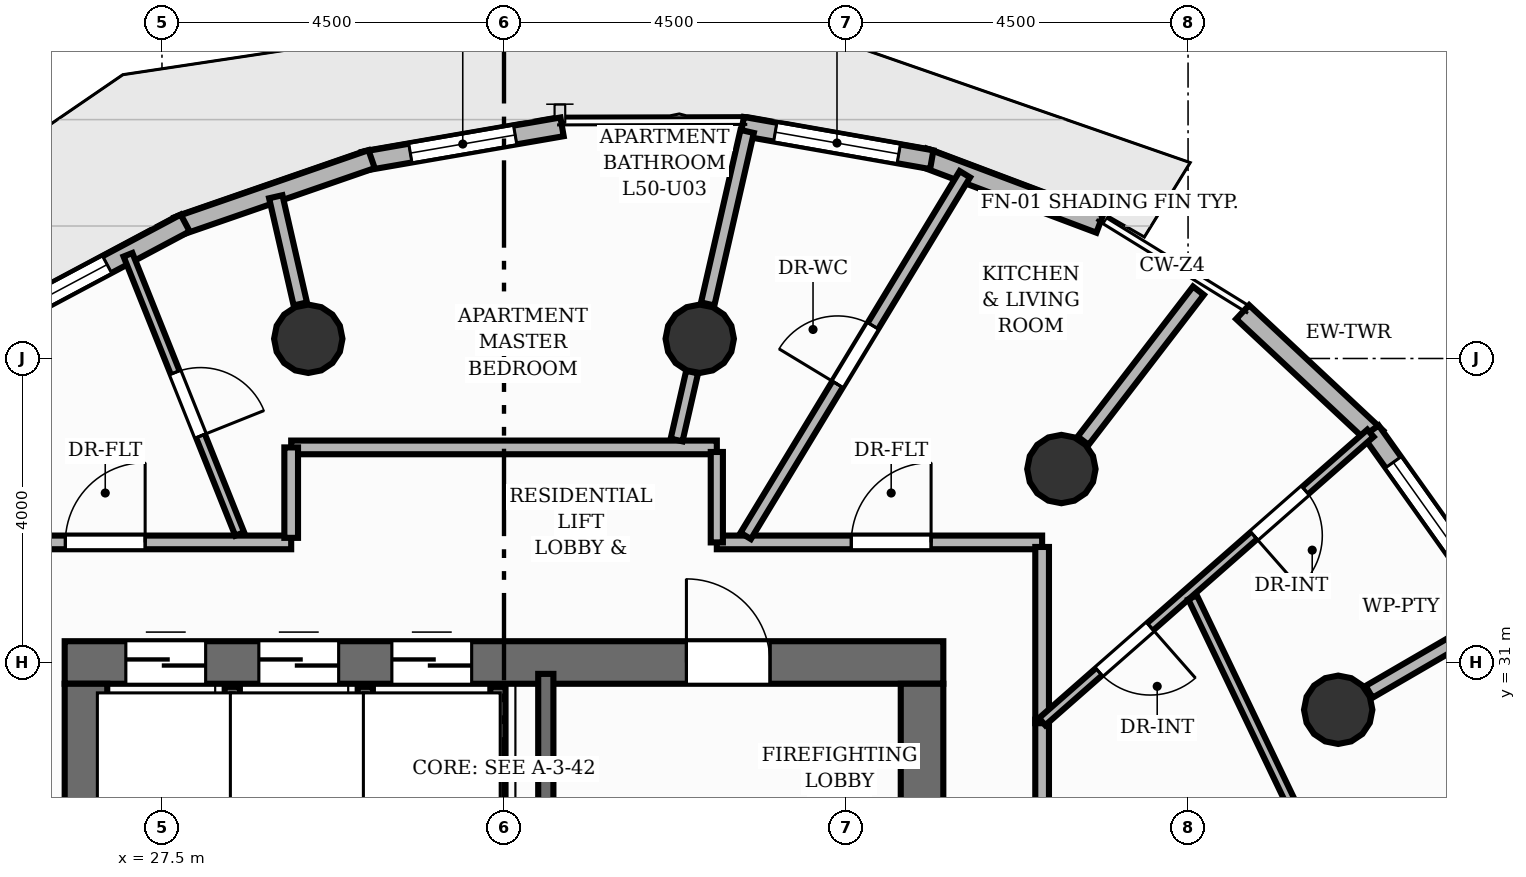
"""IFC4 building model, lengths in metres.
Left out: names, types, materials, properties, quantities, classifications, styles, units other than length and angle.
Written with IfcOpenShell. Run it as: python <this file> out.ifc"""

import sys

from ifc_helpers import new_model, si_unit, direction, frame, frame_2d, origin, origin_2d, place, context, subcontext, project, spatial, rectangle, circle, extrude, element, fill, save


model = new_model("IFC4")
c1 = context("Model", 3, precision=1e-05, world=origin(), true_north=direction((0.0, 1.0)))
c2 = subcontext(c1, "Body", "Model", "MODEL_VIEW")
j1 = project(units=[si_unit("LENGTHUNIT", "METRE"), si_unit("PLANEANGLEUNIT", "RADIAN")], contexts=[c1])
p1 = place(None, origin())
s1 = spatial("IfcSite", under=j1, at=p1, CompositionType="ELEMENT")
p2 = place(p1, origin())
s2 = spatial("IfcBuilding", under=s1, at=p2, CompositionType="ELEMENT")
p3 = place(p2, frame((0.0, 0.0, 169.44)))
s3 = spatial("IfcBuildingStorey", under=s2, at=p3, CompositionType="ELEMENT", Elevation=169.44)
p4 = place(p3, frame((26.22, 31.0, 0.0), z_axis=(0.0, 0.0, 1.0), x_axis=(1.0, 0.0, 0.0)))
e1 = element("IfcWall", 1, at=p4, inside=s3, PredefinedType="SHEAR", context=c2, shape_type="SweptSolid", body=[
    extrude(rectangle(XDim=11.56, YDim=0.56, at=frame_2d((5.78, 0.0))), origin(), (0.0, 0.0, 1.0), 3.2),
])
p5 = place(p4, frame((8.18, 0.0, 0.0)))
e2 = element("IfcOpeningElement", 2, at=p5, cuts=e1, PredefinedType="OPENING", context=c2, shape_type="SweptSolid", body=[
    extrude(rectangle(XDim=1.1, YDim=2.15, at=frame_2d((0.55, 1.075))), frame((0.0, 0.29, 0.0), z_axis=(0.0, -1.0, 0.0), x_axis=(1.0, 0.0, 0.0)), (0.0, 0.0, 1.0), 0.58),
])
p6 = place(p4, frame((0.805, 0.0, 0.0)))
e3 = element("IfcOpeningElement", 3, at=p6, cuts=e1, PredefinedType="OPENING", context=c2, shape_type="SweptSolid", body=[
    extrude(rectangle(XDim=1.05, YDim=2.15, at=frame_2d((0.525, 1.075))), frame((0.0, 0.29, 0.0), z_axis=(0.0, -1.0, 0.0), x_axis=(1.0, 0.0, 0.0)), (0.0, 0.0, 1.0), 0.58),
])
p7 = place(p4, frame((2.555, 0.0, 0.0)))
e4 = element("IfcOpeningElement", 4, at=p7, cuts=e1, PredefinedType="OPENING", context=c2, shape_type="SweptSolid", body=[
    extrude(rectangle(XDim=1.05, YDim=2.15, at=frame_2d((0.525, 1.075))), frame((0.0, 0.29, 0.0), z_axis=(0.0, -1.0, 0.0), x_axis=(1.0, 0.0, 0.0)), (0.0, 0.0, 1.0), 0.58),
])
p8 = place(p4, frame((4.305, 0.0, 0.0)))
e5 = element("IfcOpeningElement", 5, at=p8, cuts=e1, PredefinedType="OPENING", context=c2, shape_type="SweptSolid", body=[
    extrude(rectangle(XDim=1.05, YDim=2.15, at=frame_2d((0.525, 1.075))), frame((0.0, 0.29, 0.0), z_axis=(0.0, -1.0, 0.0), x_axis=(1.0, 0.0, 0.0)), (0.0, 0.0, 1.0), 0.58),
])
for number, where, z_axis, x_axis in (
    (6, (26.5, 17.28, 0.0), (0.0, 0.0, 1.0), (0.0, 1.0, 0.0)),
    (7, (37.5, 17.28, 0.0), (0.0, 0.0, 1.0), (0.0, 1.0, 0.0)),
):
    element("IfcWall", number, at=place(p3, frame(where, z_axis=z_axis, x_axis=x_axis)), inside=s3, PredefinedType="SHEAR", context=c2, shape_type="SweptSolid", body=[
        extrude(rectangle(XDim=13.44, YDim=0.56, at=frame_2d((6.72, 0.0))), origin(), (0.0, 0.0, 1.0), 3.2),
    ])
for number, where, z_axis, x_axis in (
    (8, (42.975, 30.378, 0.0), (0.0, 0.0, 1.0), (1.0, 0.0, 0.0)),
    (9, (39.333, 33.545, 0.0), (0.0, 0.0, 1.0), (1.0, 0.0, 0.0)),
    (10, (34.575, 35.26, 0.0), (0.0, 0.0, 1.0), (1.0, 0.0, 0.0)),
    (11, (29.425, 35.26, 0.0), (0.0, 0.0, 1.0), (1.0, 0.0, 0.0)),
):
    element("IfcColumn", number, at=place(p3, frame(where, z_axis=z_axis, x_axis=x_axis)), inside=s3, PredefinedType="COLUMN", context=c2, shape_type="SweptSolid", body=[
        extrude(circle(Radius=0.45, at=origin_2d()), origin(), (0.0, 0.0, 1.0), 3.2),
    ])
p9 = place(p3, frame((41.718, 35.611, 0.0), z_axis=(0.0, 0.0, 1.0), x_axis=(0.730224222865, -0.683207570465, 0.0)))
e12 = element("IfcWall", 12, at=p9, inside=s3, PredefinedType="SOLIDWALL", context=c2, shape_type="SweptSolid", body=[
    extrude(rectangle(XDim=2.415, YDim=0.25, at=frame_2d((1.207, 0.0))), origin(), (0.0, 0.0, 1.0), 2.96),
])
p10 = place(p3, frame((37.519, 37.645, 0.0), z_axis=(0.0, 0.0, 1.0), x_axis=(0.93586674787, -0.352354126172, 0.0)))
e13 = element("IfcWall", 13, at=p10, inside=s3, PredefinedType="SOLIDWALL", context=c2, shape_type="SweptSolid", body=[
    extrude(rectangle(XDim=2.478, YDim=0.25, at=frame_2d((1.239, 0.0))), origin(), (0.0, 0.0, 1.0), 2.96),
])
p11 = place(p3, frame((35.135, 38.055, 0.0), z_axis=(0.0, 0.0, 1.0), x_axis=(0.984837873762, -0.173477267688, 0.0)))
e14 = element("IfcWall", 14, at=p11, inside=s3, PredefinedType="SOLIDWALL", context=c2, shape_type="SweptSolid", body=[
    extrude(rectangle(XDim=2.532, YDim=0.25, at=frame_2d((1.266, 0.0))), origin(), (0.0, 0.0, 1.0), 2.96),
])
p12 = place(p11, frame((0.441, 0.0, 0.85)))
e15 = element("IfcOpeningElement", 15, at=p12, cuts=e14, PredefinedType="OPENING", context=c2, shape_type="SweptSolid", body=[
    extrude(rectangle(XDim=1.65, YDim=1.55, at=frame_2d((0.825, 0.775))), frame((0.0, 0.135, 0.0), z_axis=(0.0, -1.0, 0.0), x_axis=(1.0, 0.0, 0.0)), (0.0, 0.0, 1.0), 0.27),
])
p13 = place(p3, frame((30.152, 37.595, 0.0), z_axis=(0.0, 0.0, 1.0), x_axis=(0.985331154473, 0.170653203967, 0.0)))
e16 = element("IfcWall", 16, at=p13, inside=s3, PredefinedType="SOLIDWALL", context=c2, shape_type="SweptSolid", body=[
    extrude(rectangle(XDim=2.651, YDim=0.25, at=frame_2d((1.325, 0.0))), origin(), (0.0, 0.0, 1.0), 2.96),
])
p14 = place(p13, frame((0.625, 0.0, 0.85)))
e17 = element("IfcOpeningElement", 17, at=p14, cuts=e16, PredefinedType="OPENING", context=c2, shape_type="SweptSolid", body=[
    extrude(rectangle(XDim=1.4, YDim=1.55, at=frame_2d((0.7, 0.775))), frame((0.0, 0.135, 0.0), z_axis=(0.0, -1.0, 0.0), x_axis=(1.0, 0.0, 0.0)), (0.0, 0.0, 1.0), 0.27),
])
p15 = place(p3, frame((27.705, 36.739, 0.0), z_axis=(0.0, 0.0, 1.0), x_axis=(0.945016150651, 0.327023661236, 0.0)))
e18 = element("IfcWall", 18, at=p15, inside=s3, PredefinedType="SOLIDWALL", context=c2, shape_type="SweptSolid", body=[
    extrude(rectangle(XDim=2.702, YDim=0.25, at=frame_2d((1.351, 0.0))), origin(), (0.0, 0.0, 1.0), 2.96),
])
p16 = place(p3, frame((25.388, 35.495, 0.0), z_axis=(0.0, 0.0, 1.0), x_axis=(0.88257494418, 0.47017174299, 0.0)))
e19 = element("IfcWall", 19, at=p16, inside=s3, PredefinedType="SOLIDWALL", context=c2, shape_type="SweptSolid", body=[
    extrude(rectangle(XDim=2.739, YDim=0.25, at=frame_2d((1.369, 0.0))), origin(), (0.0, 0.0, 1.0), 2.96),
])
p17 = place(p16, frame((0.175, 0.0, 0.85)))
e20 = element("IfcOpeningElement", 20, at=p17, cuts=e19, PredefinedType="OPENING", context=c2, shape_type="SweptSolid", body=[
    extrude(rectangle(XDim=1.4, YDim=1.55, at=frame_2d((0.7, 0.775))), frame((0.0, 0.135, 0.0), z_axis=(0.0, -1.0, 0.0), x_axis=(1.0, 0.0, 0.0)), (0.0, 0.0, 1.0), 0.27),
])
p18 = place(p3, frame((43.406, 34.047, 0.0), z_axis=(0.0, 0.0, 1.0), x_axis=(0.579505880656, -0.814968057217, 0.0)))
e21 = element("IfcWall", 21, at=p18, inside=s3, PredefinedType="SOLIDWALL", context=c2, shape_type="SweptSolid", body=[
    extrude(rectangle(XDim=2.415, YDim=0.25, at=frame_2d((1.208, 0.0))), origin(), (0.0, 0.0, 1.0), 2.96),
])
p19 = place(p18, frame((0.507, 0.0, 0.85)))
e22 = element("IfcOpeningElement", 22, at=p19, cuts=e21, PredefinedType="OPENING", context=c2, shape_type="SweptSolid", body=[
    extrude(rectangle(XDim=1.4, YDim=1.55, at=frame_2d((0.7, 0.775))), frame((0.0, 0.135, 0.0), z_axis=(0.0, -1.0, 0.0), x_axis=(1.0, 0.0, 0.0)), (0.0, 0.0, 1.0), 0.27),
])
p20 = place(p3, frame((32.55, 27.35, 0.0), z_axis=(0.0, 0.0, 1.0), x_axis=(0.0, 1.0, 0.0)))
e23 = element("IfcWall", 23, at=p20, inside=s3, PredefinedType="SHEAR", context=c2, shape_type="SweptSolid", body=[
    extrude(rectangle(XDim=3.5, YDim=0.2, at=frame_2d((1.75, 0.0))), origin(), (0.0, 0.0, 1.0), 3.2),
])
for number, where, z_axis, x_axis in (
    (24, (31.92, 29.02, 0.0), (0.0, 0.0, 1.0), (0.0, 1.0, 0.0)),
    (25, (28.425, 29.02, 0.0), (0.0, 0.0, 1.0), (0.0, 1.0, 0.0)),
    (26, (30.175, 29.02, 0.0), (0.0, 0.0, 1.0), (0.0, 1.0, 0.0)),
):
    element("IfcWall", number, at=place(p3, frame(where, z_axis=z_axis, x_axis=x_axis)), inside=s3, PredefinedType="SHEAR", context=c2, shape_type="SweptSolid", body=[
        extrude(rectangle(XDim=1.66, YDim=0.2, at=frame_2d((0.83, 0.0))), origin(), (0.0, 0.0, 1.0), 3.2),
    ])
p21 = place(p3, frame((43.382, 30.614, 0.0), z_axis=(0.0, 0.0, 1.0), x_axis=(0.864604991586, 0.502452195264, 0.0)))
e27 = element("IfcWall", 27, at=p21, inside=s3, PredefinedType="PARTITIONING", context=c2, shape_type="SweptSolid", body=[
    extrude(rectangle(XDim=1.841, YDim=0.18, at=frame_2d((0.92, 0.0))), origin(), (0.0, 0.0, 1.0), 2.404),
])
p22 = place(p3, frame((39.62, 33.918, 0.0), z_axis=(0.0, 0.0, 1.0), x_axis=(0.609279402228, 0.792955616678, 0.0)))
e28 = element("IfcWall", 28, at=p22, inside=s3, PredefinedType="PARTITIONING", context=c2, shape_type="SweptSolid", body=[
    extrude(rectangle(XDim=2.49, YDim=0.18, at=frame_2d((1.245, 0.0))), origin(), (0.0, 0.0, 1.0), 2.404),
])
p23 = place(p3, frame((34.68, 35.718, 0.0), z_axis=(0.0, 0.0, 1.0), x_axis=(0.222998449778, 0.974818799263, 0.0)))
e29 = element("IfcWall", 29, at=p23, inside=s3, PredefinedType="PARTITIONING", context=c2, shape_type="SweptSolid", body=[
    extrude(rectangle(XDim=2.329, YDim=0.18, at=frame_2d((1.164, 0.0))), origin(), (0.0, 0.0, 1.0), 2.404),
])
p24 = place(p3, frame((29.32, 35.718, 0.0), z_axis=(0.0, 0.0, 1.0), x_axis=(-0.22299884629, 0.974818708557, 0.0)))
e30 = element("IfcWall", 30, at=p24, inside=s3, PredefinedType="PARTITIONING", context=c2, shape_type="SweptSolid", body=[
    extrude(rectangle(XDim=1.447, YDim=0.18, at=frame_2d((0.724, 0.0))), origin(), (0.0, 0.0, 1.0), 2.404),
])
p25 = place(p3, frame((39.08, 30.248, 0.0), z_axis=(0.0, 0.0, 1.0), x_axis=(0.0, -1.0, 0.0)))
e31 = element("IfcWall", 31, at=p25, inside=s3, PredefinedType="PARTITIONING", context=c2, shape_type="SweptSolid", body=[
    extrude(rectangle(XDim=14.828, YDim=0.18, at=frame_2d((7.414, 0.0))), origin(), (0.0, 0.0, 1.0), 2.955),
])
p26 = place(p25, frame((6.351, 0.0, 0.0)))
e32 = element("IfcOpeningElement", 32, at=p26, cuts=e31, PredefinedType="OPENING", context=c2, shape_type="SweptSolid", body=[
    extrude(rectangle(XDim=1.05, YDim=2.15, at=frame_2d((0.525, 1.075))), frame((0.0, 0.1, 0.0), z_axis=(0.0, -1.0, 0.0), x_axis=(1.0, 0.0, 0.0)), (0.0, 0.0, 1.0), 0.2),
])
p27 = place(p3, frame((34.8, 32.58, 0.0), z_axis=(0.0, 0.0, 1.0), x_axis=(1.0, 0.0, 0.0)))
e33 = element("IfcWall", 33, at=p27, inside=s3, PredefinedType="PARTITIONING", context=c2, shape_type="SweptSolid", body=[
    extrude(rectangle(XDim=4.28, YDim=0.18, at=frame_2d((2.14, 0.0))), origin(), (0.0, 0.0, 1.0), 2.955),
])
p28 = place(p27, frame((1.769, 0.0, 0.0)))
e34 = element("IfcOpeningElement", 34, at=p28, cuts=e33, PredefinedType="OPENING", context=c2, shape_type="SweptSolid", body=[
    extrude(rectangle(XDim=1.05, YDim=2.15, at=frame_2d((0.525, 1.075))), frame((0.0, 0.1, 0.0), z_axis=(0.0, -1.0, 0.0), x_axis=(1.0, 0.0, 0.0)), (0.0, 0.0, 1.0), 0.2),
])
p29 = place(p3, frame((39.08, 32.52, 0.0), z_axis=(0.0, 0.0, 1.0), x_axis=(0.0, -1.0, 0.0)))
e35 = element("IfcWall", 35, at=p29, inside=s3, PredefinedType="PARTITIONING", context=c2, shape_type="SweptSolid", body=[
    extrude(rectangle(XDim=2.319, YDim=0.18, at=frame_2d((1.159, 0.0))), origin(), (0.0, 0.0, 1.0), 2.955),
])
p30 = place(p3, frame((29.2, 33.83, 0.0), z_axis=(0.0, 0.0, 1.0), x_axis=(1.0, 0.0, 0.0)))
e36 = element("IfcWall", 36, at=p30, inside=s3, PredefinedType="PARTITIONING", context=c2, shape_type="SweptSolid", body=[
    extrude(rectangle(XDim=5.6, YDim=0.18, at=frame_2d((2.8, 0.0))), origin(), (0.0, 0.0, 1.0), 2.955),
])
p31 = place(p3, frame((34.8, 33.77, 0.0), z_axis=(0.0, 0.0, 1.0), x_axis=(0.0, -1.0, 0.0)))
e37 = element("IfcWall", 37, at=p31, inside=s3, PredefinedType="PLUMBINGWALL", context=c2, shape_type="SweptSolid", body=[
    extrude(rectangle(XDim=1.19, YDim=0.16, at=frame_2d((0.595, 0.0))), origin(), (0.0, 0.0, 1.0), 2.955),
])
p32 = place(p3, frame((24.92, 32.58, 0.0), z_axis=(0.0, 0.0, 1.0), x_axis=(1.0, 0.0, 0.0)))
e38 = element("IfcWall", 38, at=p32, inside=s3, PredefinedType="PARTITIONING", context=c2, shape_type="SweptSolid", body=[
    extrude(rectangle(XDim=4.28, YDim=0.18, at=frame_2d((2.14, 0.0))), origin(), (0.0, 0.0, 1.0), 2.955),
])
p33 = place(p32, frame((1.309, 0.0, 0.0)))
e39 = element("IfcOpeningElement", 39, at=p33, cuts=e38, PredefinedType="OPENING", context=c2, shape_type="SweptSolid", body=[
    extrude(rectangle(XDim=1.05, YDim=2.15, at=frame_2d((0.525, 1.075))), frame((0.0, 0.1, 0.0), z_axis=(0.0, -1.0, 0.0), x_axis=(1.0, 0.0, 0.0)), (0.0, 0.0, 1.0), 0.2),
])
p34 = place(p3, frame((29.2, 32.64, 0.0), z_axis=(0.0, 0.0, 1.0), x_axis=(0.0, 1.0, 0.0)))
e40 = element("IfcWall", 40, at=p34, inside=s3, PredefinedType="PARTITIONING", context=c2, shape_type="SweptSolid", body=[
    extrude(rectangle(XDim=1.19, YDim=0.18, at=frame_2d((0.595, 0.0))), origin(), (0.0, 0.0, 1.0), 2.955),
])
p35 = place(p3, frame((35.18, 32.666, 0.0), z_axis=(0.0, 0.0, 1.0), x_axis=(0.518194743754, 0.855262654128, 0.0)))
e41 = element("IfcWall", 41, at=p35, inside=s3, PredefinedType="PLUMBINGWALL", context=c2, shape_type="SweptSolid", body=[
    extrude(rectangle(XDim=5.564, YDim=0.16, at=frame_2d((2.782, 0.0))), origin(), (0.0, 0.0, 1.0), 2.692),
])
p36 = place(p35, frame((2.332, 0.0, 0.0)))
e42 = element("IfcOpeningElement", 42, at=p36, cuts=e41, PredefinedType="OPENING", context=c2, shape_type="SweptSolid", body=[
    extrude(rectangle(XDim=0.9, YDim=2.1, at=frame_2d((0.45, 1.05))), frame((0.0, 0.09, 0.0), z_axis=(0.0, -1.0, 0.0), x_axis=(1.0, 0.0, 0.0)), (0.0, 0.0, 1.0), 0.18),
])
p37 = place(p3, frame((43.4, 34.017, 0.0), z_axis=(0.0, 0.0, 1.0), x_axis=(-0.751212741732, -0.660060161394, 0.0)))
e43 = element("IfcWall", 43, at=p37, inside=s3, PredefinedType="PARTITIONING", context=c2, shape_type="SweptSolid", body=[
    extrude(rectangle(XDim=5.75, YDim=0.125, at=frame_2d((2.875, 0.0))), origin(), (0.0, 0.0, 1.0), 2.955),
])
p38 = place(p37, frame((1.141, 0.0, 0.0)))
e44 = element("IfcOpeningElement", 44, at=p38, cuts=e43, PredefinedType="OPENING", context=c2, shape_type="SweptSolid", body=[
    extrude(rectangle(XDim=0.9, YDim=2.1, at=frame_2d((0.45, 1.05))), frame((0.0, 0.073, 0.0), z_axis=(0.0, -1.0, 0.0), x_axis=(1.0, 0.0, 0.0)), (0.0, 0.0, 1.0), 0.145),
])
p39 = place(p37, frame((3.856, 0.0, 0.0)))
e45 = element("IfcOpeningElement", 45, at=p39, cuts=e43, PredefinedType="OPENING", context=c2, shape_type="SweptSolid", body=[
    extrude(rectangle(XDim=0.9, YDim=2.1, at=frame_2d((0.45, 1.05))), frame((0.0, 0.073, 0.0), z_axis=(0.0, -1.0, 0.0), x_axis=(1.0, 0.0, 0.0)), (0.0, 0.0, 1.0), 0.145),
])
p40 = place(p3, frame((34.271, 33.927, 0.0), z_axis=(0.0, 0.0, 1.0), x_axis=(0.222991179816, 0.974820462303, 0.0)))
e46 = element("IfcWall", 46, at=p40, inside=s3, PredefinedType="PLUMBINGWALL", context=c2, shape_type="SweptSolid", body=[
    extrude(rectangle(XDim=0.917, YDim=0.16, at=frame_2d((0.458, 0.0))), origin(), (0.0, 0.0, 1.0), 2.404),
])
p41 = place(p3, frame((43.806, 26.121, 0.0), z_axis=(0.0, 0.0, 1.0), x_axis=(-0.431903618355, 0.901919766083, 0.0)))
e47 = element("IfcWall", 47, at=p41, inside=s3, PredefinedType="PARTITIONING", context=c2, shape_type="SweptSolid", body=[
    extrude(rectangle(XDim=6.361, YDim=0.125, at=frame_2d((3.18, 0.0))), origin(), (0.0, 0.0, 1.0), 2.488),
])
p42 = place(p3, frame((27.053, 36.365, 0.0), z_axis=(0.0, 0.0, 1.0), x_axis=(0.371454506587, -0.928451156247, 0.0)))
e48 = element("IfcWall", 48, at=p42, inside=s3, PredefinedType="PARTITIONING", context=c2, shape_type="SweptSolid", body=[
    extrude(rectangle(XDim=3.957, YDim=0.125, at=frame_2d((1.979, 0.0))), origin(), (0.0, 0.0, 1.0), 2.692),
])
p43 = place(p42, frame((1.668, 0.0, 0.0)))
e49 = element("IfcOpeningElement", 49, at=p43, cuts=e48, PredefinedType="OPENING", context=c2, shape_type="SweptSolid", body=[
    extrude(rectangle(XDim=0.9, YDim=2.1, at=frame_2d((0.45, 1.05))), frame((0.0, 0.073, 0.0), z_axis=(0.0, -1.0, 0.0), x_axis=(1.0, 0.0, 0.0)), (0.0, 0.0, 1.0), 0.145),
])
p44 = place(p12, origin())
e50 = element("IfcWindow", 50, at=p44, inside=s3, PartitioningType="SINGLE_PANEL", PredefinedType="WINDOW", context=c2, shape_type="SweptSolid", body=[
    extrude(rectangle(XDim=1.65, YDim=1.55, at=frame_2d((0.825, 0.775))), frame((0.0, 0.03, 0.0), z_axis=(0.0, -1.0, 0.0), x_axis=(1.0, 0.0, 0.0)), (0.0, 0.0, 1.0), 0.06),
])
fill(e15, e50)
p45 = place(p14, origin())
e51 = element("IfcWindow", 51, at=p45, inside=s3, PartitioningType="SINGLE_PANEL", PredefinedType="WINDOW", context=c2, shape_type="SweptSolid", body=[
    extrude(rectangle(XDim=1.4, YDim=1.55, at=frame_2d((0.7, 0.775))), frame((0.0, 0.03, 0.0), z_axis=(0.0, -1.0, 0.0), x_axis=(1.0, 0.0, 0.0)), (0.0, 0.0, 1.0), 0.06),
])
fill(e17, e51)
p46 = place(p17, origin())
e52 = element("IfcWindow", 52, at=p46, inside=s3, PartitioningType="SINGLE_PANEL", PredefinedType="WINDOW", context=c2, shape_type="SweptSolid", body=[
    extrude(rectangle(XDim=1.4, YDim=1.55, at=frame_2d((0.7, 0.775))), frame((0.0, 0.03, 0.0), z_axis=(0.0, -1.0, 0.0), x_axis=(1.0, 0.0, 0.0)), (0.0, 0.0, 1.0), 0.06),
])
fill(e20, e52)
p47 = place(p19, origin())
e53 = element("IfcWindow", 53, at=p47, inside=s3, PartitioningType="SINGLE_PANEL", PredefinedType="WINDOW", context=c2, shape_type="SweptSolid", body=[
    extrude(rectangle(XDim=1.4, YDim=1.55, at=frame_2d((0.7, 0.775))), frame((0.0, 0.03, 0.0), z_axis=(0.0, -1.0, 0.0), x_axis=(1.0, 0.0, 0.0)), (0.0, 0.0, 1.0), 0.06),
])
fill(e22, e53)
p48 = place(p5, origin())
e54 = element("IfcDoor", 54, at=p48, inside=s3, OperationType="SINGLE_SWING_LEFT", PredefinedType="DOOR", context=c2, shape_type="SweptSolid", body=[
    extrude(rectangle(XDim=1.1, YDim=2.15, at=frame_2d((0.55, 1.075))), frame((0.0, 0.025, 0.0), z_axis=(0.0, -1.0, 0.0), x_axis=(1.0, 0.0, 0.0)), (0.0, 0.0, 1.0), 0.05),
])
fill(e2, e54)
p49 = place(p6, origin())
e55 = element("IfcDoor", 55, at=p49, inside=s3, OperationType="DOUBLE_DOOR_SLIDING", PredefinedType="DOOR", context=c2, shape_type="SweptSolid", body=[
    extrude(rectangle(XDim=1.05, YDim=2.15, at=frame_2d((0.525, 1.075))), frame((0.0, 0.025, 0.0), z_axis=(0.0, -1.0, 0.0), x_axis=(1.0, 0.0, 0.0)), (0.0, 0.0, 1.0), 0.05),
])
fill(e3, e55)
p50 = place(p7, origin())
e56 = element("IfcDoor", 56, at=p50, inside=s3, OperationType="DOUBLE_DOOR_SLIDING", PredefinedType="DOOR", context=c2, shape_type="SweptSolid", body=[
    extrude(rectangle(XDim=1.05, YDim=2.15, at=frame_2d((0.525, 1.075))), frame((0.0, 0.025, 0.0), z_axis=(0.0, -1.0, 0.0), x_axis=(1.0, 0.0, 0.0)), (0.0, 0.0, 1.0), 0.05),
])
fill(e4, e56)
p51 = place(p8, origin())
e57 = element("IfcDoor", 57, at=p51, inside=s3, OperationType="DOUBLE_DOOR_SLIDING", PredefinedType="DOOR", context=c2, shape_type="SweptSolid", body=[
    extrude(rectangle(XDim=1.05, YDim=2.15, at=frame_2d((0.525, 1.075))), frame((0.0, 0.025, 0.0), z_axis=(0.0, -1.0, 0.0), x_axis=(1.0, 0.0, 0.0)), (0.0, 0.0, 1.0), 0.05),
])
fill(e5, e57)
p52 = place(p28, origin())
e58 = element("IfcDoor", 58, at=p52, inside=s3, OperationType="SINGLE_SWING_RIGHT", PredefinedType="DOOR", context=c2, shape_type="SweptSolid", body=[
    extrude(rectangle(XDim=1.05, YDim=2.15, at=frame_2d((0.525, 1.075))), frame((0.0, 0.025, 0.0), z_axis=(0.0, -1.0, 0.0), x_axis=(1.0, 0.0, 0.0)), (0.0, 0.0, 1.0), 0.05),
])
fill(e34, e58)
p53 = place(p36, origin())
e59 = element("IfcDoor", 59, at=p53, inside=s3, OperationType="SINGLE_SWING_LEFT", PredefinedType="DOOR", context=c2, shape_type="SweptSolid", body=[
    extrude(rectangle(XDim=0.9, YDim=2.1, at=frame_2d((0.45, 1.05))), frame((0.0, 0.025, 0.0), z_axis=(0.0, -1.0, 0.0), x_axis=(1.0, 0.0, 0.0)), (0.0, 0.0, 1.0), 0.05),
])
fill(e42, e59)
p54 = place(p38, origin())
e60 = element("IfcDoor", 60, at=p54, inside=s3, OperationType="SINGLE_SWING_RIGHT", PredefinedType="DOOR", context=c2, shape_type="SweptSolid", body=[
    extrude(rectangle(XDim=0.9, YDim=2.1, at=frame_2d((0.45, 1.05))), frame((0.0, 0.025, 0.0), z_axis=(0.0, -1.0, 0.0), x_axis=(1.0, 0.0, 0.0)), (0.0, 0.0, 1.0), 0.05),
])
fill(e44, e60)
p55 = place(p39, origin())
e61 = element("IfcDoor", 61, at=p55, inside=s3, OperationType="SINGLE_SWING_LEFT", PredefinedType="DOOR", context=c2, shape_type="SweptSolid", body=[
    extrude(rectangle(XDim=0.9, YDim=2.1, at=frame_2d((0.45, 1.05))), frame((0.0, 0.025, 0.0), z_axis=(0.0, -1.0, 0.0), x_axis=(1.0, 0.0, 0.0)), (0.0, 0.0, 1.0), 0.05),
])
fill(e45, e61)
p56 = place(p33, origin())
e62 = element("IfcDoor", 62, at=p56, inside=s3, OperationType="SINGLE_SWING_RIGHT", PredefinedType="DOOR", context=c2, shape_type="SweptSolid", body=[
    extrude(rectangle(XDim=1.05, YDim=2.15, at=frame_2d((0.525, 1.075))), frame((0.0, 0.025, 0.0), z_axis=(0.0, -1.0, 0.0), x_axis=(1.0, 0.0, 0.0)), (0.0, 0.0, 1.0), 0.05),
])
fill(e39, e62)
p57 = place(p43, origin())
e63 = element("IfcDoor", 63, at=p57, inside=s3, OperationType="SINGLE_SWING_RIGHT", PredefinedType="DOOR", context=c2, shape_type="SweptSolid", body=[
    extrude(rectangle(XDim=0.9, YDim=2.1, at=frame_2d((0.45, 1.05))), frame((0.0, 0.025, 0.0), z_axis=(0.0, -1.0, 0.0), x_axis=(1.0, 0.0, 0.0)), (0.0, 0.0, 1.0), 0.05),
])
fill(e49, e63)
save(model, sys.argv[1])
